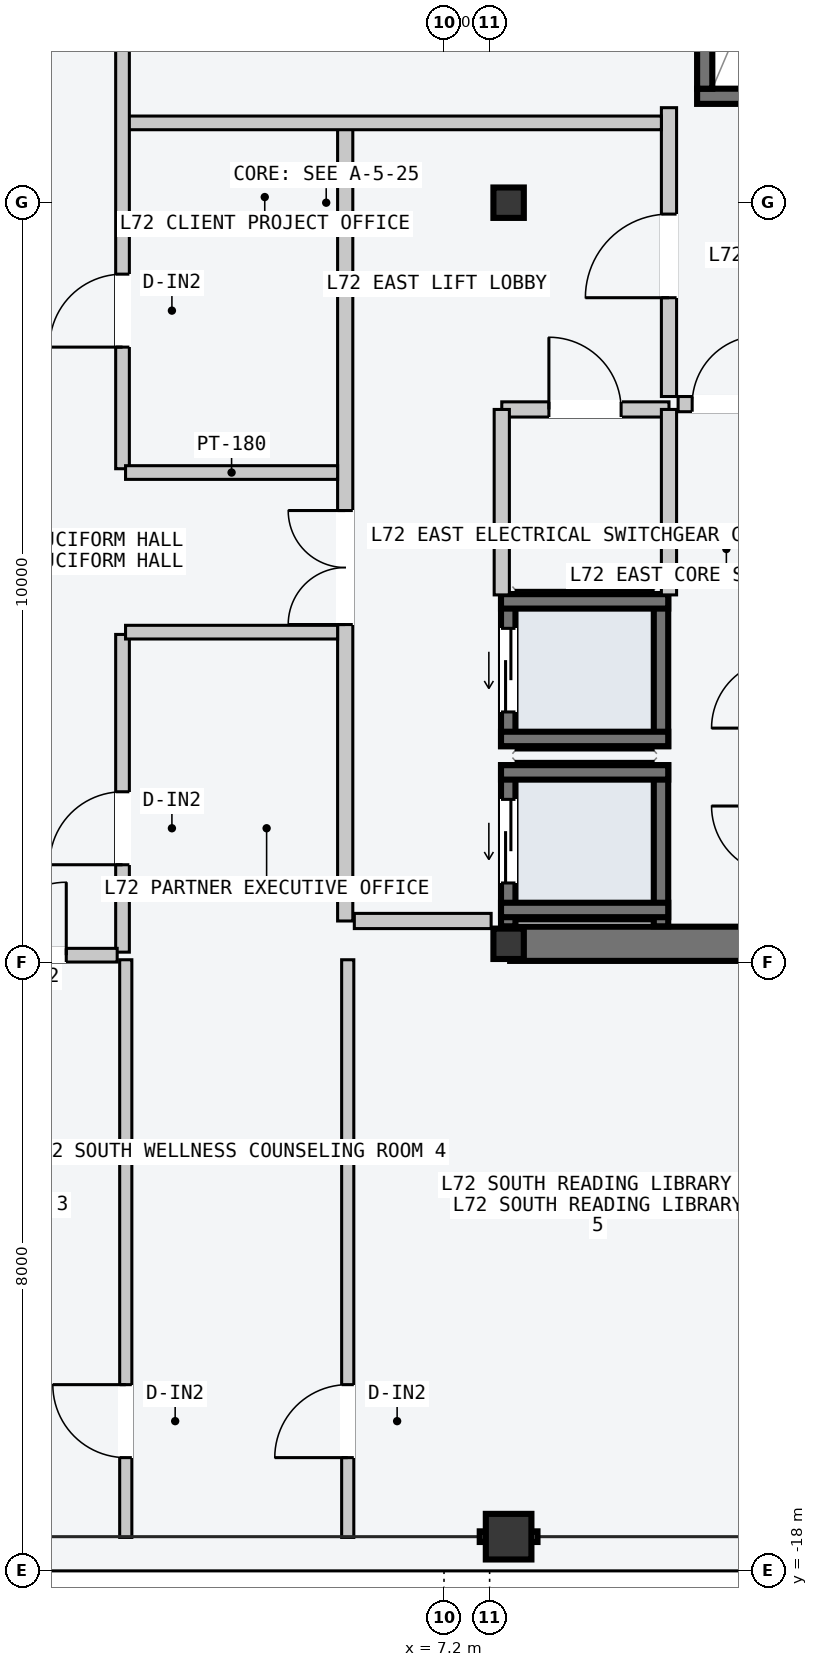
"""IFC4 building model, lengths in metres.
Left out: names, types, materials, properties, quantities, classifications, styles, units other than length and angle.
Written with IfcOpenShell. Run it as: python <this file> out.ifc"""

import sys

from ifc_helpers import new_model, si_unit, direction, frame, frame_2d, origin, origin_2d, place, context, subcontext, project, spatial, rectangle, hollow_rectangle, i_section, extrude, element, fill, save


model = new_model("IFC4")
c1 = context("Model", 3, precision=1e-05, world=origin(), true_north=direction((0.0, 1.0)))
c2 = subcontext(c1, "Body", "Model", "MODEL_VIEW")
j1 = project(units=[si_unit("LENGTHUNIT", "METRE"), si_unit("PLANEANGLEUNIT", "RADIAN")], contexts=[c1])
p1 = place(None, origin())
s1 = spatial("IfcSite", under=j1, at=p1, CompositionType="ELEMENT")
p2 = place(p1, origin())
s2 = spatial("IfcBuilding", under=s1, at=p2, CompositionType="ELEMENT")
p3 = place(p2, frame((0.0, 0.0, 272.4)))
s3 = spatial("IfcBuildingStorey", under=s2, at=p3, CompositionType="ELEMENT", Elevation=272.4)
p4 = place(p3, frame((8.07, -9.75, -0.2), z_axis=(0.0, 0.0, 1.0), x_axis=(1.0, 0.0, 0.0)))
e1 = element("IfcWall", 1, at=p4, inside=s3, PredefinedType="SHEAR", context=c2, shape_type="SweptSolid", body=[
    extrude(rectangle(XDim=6.46, YDim=0.45, at=frame_2d((3.23, 0.0))), origin(), (0.0, 0.0, 1.0), 3.6),
])
p5 = place(p3, frame((10.53, 1.4, -0.2), z_axis=(0.0, 0.0, 1.0), x_axis=(1.0, 0.0, 0.0)))
e2 = element("IfcWall", 2, at=p5, inside=s3, PredefinedType="SOLIDWALL", context=c2, shape_type="SweptSolid", body=[
    extrude(rectangle(XDim=3.72, YDim=0.2, at=frame_2d((1.86, 0.0))), origin(), (0.0, 0.0, 1.0), 3.6),
])
p6 = place(p5, frame((1.5, 0.0, 0.2)))
e3 = element("IfcOpeningElement", 3, at=p6, cuts=e2, PredefinedType="OPENING", context=c2, shape_type="SweptSolid", body=[
    extrude(rectangle(XDim=1.12, YDim=2.18, at=frame_2d((0.56, 1.09))), frame((0.0, 0.11, 0.0), z_axis=(0.0, -1.0, 0.0), x_axis=(1.0, 0.0, 0.0)), (0.0, 0.0, 1.0), 0.22),
])
p7 = place(p3, frame((10.63, 1.5, -0.2), z_axis=(0.0, 0.0, 1.0), x_axis=(0.0, 1.0, 0.0)))
e4 = element("IfcWall", 4, at=p7, inside=s3, PredefinedType="SOLIDWALL", context=c2, shape_type="SweptSolid", body=[
    extrude(rectangle(XDim=7.8, YDim=0.2, at=frame_2d((3.9, 0.0))), origin(), (0.0, 0.0, 1.0), 3.6),
])
for number, where, z_axis, x_axis in (
    (5, (8.05, -9.75, 0.0), (0.0, 0.0, 1.0), (1.0, 0.0, 0.0)),
    (6, (8.05, 0.0, 0.0), (0.0, 0.0, 1.0), (1.0, 0.0, 0.0)),
):
    element("IfcColumn", number, at=place(p3, frame(where, z_axis=z_axis, x_axis=x_axis)), inside=s3, PredefinedType="COLUMN", context=c2, shape_type="SweptSolid", body=[
        extrude(i_section(OverallWidth=0.4, OverallDepth=0.4, WebThickness=0.013, FlangeThickness=0.021, at=origin_2d()), origin(), (0.0, 0.0, 1.0), 3.6),
    ])
p8 = place(p3, frame((8.05, -17.55, 0.0), z_axis=(0.0, 0.0, 1.0), x_axis=(1.0, 0.0, 0.0)))
e7 = element("IfcColumn", 7, at=p8, inside=s3, PredefinedType="COLUMN", context=c2, shape_type="SweptSolid", body=[
    extrude(hollow_rectangle(XDim=0.6, YDim=0.6, WallThickness=0.025, at=origin_2d()), origin(), (0.0, 0.0, 1.0), 3.6),
])
p9 = place(p3, frame((8.045, -9.52, -0.2), z_axis=(0.0, 0.0, 1.0), x_axis=(0.0, 1.0, 0.0)))
e8 = element("IfcWall", 8, at=p9, inside=s3, PredefinedType="SOLIDWALL", context=c2, shape_type="SweptSolid", body=[
    extrude(rectangle(XDim=2.12, YDim=0.19, at=frame_2d((1.06, 0.0))), origin(), (0.0, 0.0, 1.0), 3.6),
])
p10 = place(p9, frame((0.57, 0.0, 0.2)))
e9 = element("IfcOpeningElement", 9, at=p10, cuts=e8, PredefinedType="OPENING", context=c2, shape_type="SweptSolid", body=[
    extrude(rectangle(XDim=1.1, YDim=2.2, at=frame_2d((0.55, 1.1))), frame((0.0, 0.105, 0.0), z_axis=(0.0, -1.0, 0.0), x_axis=(1.0, 0.0, 0.0)), (0.0, 0.0, 1.0), 0.21),
])
p11 = place(p3, frame((10.055, -9.52, -0.2), z_axis=(0.0, 0.0, 1.0), x_axis=(0.0, 1.0, 0.0)))
e10 = element("IfcWall", 10, at=p11, inside=s3, PredefinedType="SOLIDWALL", context=c2, shape_type="SweptSolid", body=[
    extrude(rectangle(XDim=2.12, YDim=0.19, at=frame_2d((1.06, 0.0))), origin(), (0.0, 0.0, 1.0), 3.6),
])
for number, where, z_axis, x_axis in (
    (11, (7.95, -7.495, -0.2), (0.0, 0.0, 1.0), (1.0, 0.0, 0.0)),
    (12, (7.95, -9.305, -0.2), (0.0, 0.0, 1.0), (1.0, 0.0, 0.0)),
):
    element("IfcWall", number, at=place(p3, frame(where, z_axis=z_axis, x_axis=x_axis)), inside=s3, PredefinedType="SOLIDWALL", context=c2, shape_type="SweptSolid", body=[
        extrude(rectangle(XDim=2.2, YDim=0.19, at=frame_2d((1.1, 0.0))), origin(), (0.0, 0.0, 1.0), 3.6),
    ])
p12 = place(p3, frame((8.045, -7.15, -0.2), z_axis=(0.0, 0.0, 1.0), x_axis=(0.0, 1.0, 0.0)))
e13 = element("IfcWall", 13, at=p12, inside=s3, PredefinedType="SOLIDWALL", context=c2, shape_type="SweptSolid", body=[
    extrude(rectangle(XDim=2.0, YDim=0.19, at=frame_2d((1.0, 0.0))), origin(), (0.0, 0.0, 1.0), 3.6),
])
p13 = place(p12, frame((0.45, 0.0, 0.2)))
e14 = element("IfcOpeningElement", 14, at=p13, cuts=e13, PredefinedType="OPENING", context=c2, shape_type="SweptSolid", body=[
    extrude(rectangle(XDim=1.1, YDim=2.2, at=frame_2d((0.55, 1.1))), frame((0.0, 0.105, 0.0), z_axis=(0.0, -1.0, 0.0), x_axis=(1.0, 0.0, 0.0)), (0.0, 0.0, 1.0), 0.21),
])
p14 = place(p3, frame((10.055, -7.15, -0.2), z_axis=(0.0, 0.0, 1.0), x_axis=(0.0, 1.0, 0.0)))
e15 = element("IfcWall", 15, at=p14, inside=s3, PredefinedType="SOLIDWALL", context=c2, shape_type="SweptSolid", body=[
    extrude(rectangle(XDim=2.0, YDim=0.19, at=frame_2d((1.0, 0.0))), origin(), (0.0, 0.0, 1.0), 3.6),
])
for number, where, z_axis, x_axis in (
    (16, (7.95, -5.245, -0.2), (0.0, 0.0, 1.0), (1.0, 0.0, 0.0)),
    (17, (7.95, -7.055, -0.2), (0.0, 0.0, 1.0), (1.0, 0.0, 0.0)),
):
    element("IfcWall", number, at=place(p3, frame(where, z_axis=z_axis, x_axis=x_axis)), inside=s3, PredefinedType="SOLIDWALL", context=c2, shape_type="SweptSolid", body=[
        extrude(rectangle(XDim=2.2, YDim=0.19, at=frame_2d((1.1, 0.0))), origin(), (0.0, 0.0, 1.0), 3.6),
    ])
p15 = place(p3, frame((5.9, -9.45, 0.0), z_axis=(0.0, 0.0, 1.0), x_axis=(0.0, 1.0, 0.0)))
e18 = element("IfcWall", 18, at=p15, inside=s3, PredefinedType="PARTITIONING", context=c2, shape_type="SweptSolid", body=[
    extrude(rectangle(XDim=10.5, YDim=0.2, at=frame_2d((5.25, 0.0))), origin(), (0.0, 0.0, 1.0), 3.4),
])
p16 = place(p15, frame((3.9, 0.0, 0.0)))
e19 = element("IfcOpeningElement", 19, at=p16, cuts=e18, PredefinedType="OPENING", context=c2, shape_type="SweptSolid", body=[
    extrude(rectangle(XDim=1.5, YDim=2.2, at=frame_2d((0.75, 1.1))), frame((0.0, 0.11, 0.0), z_axis=(0.0, -1.0, 0.0), x_axis=(1.0, 0.0, 0.0)), (0.0, 0.0, 1.0), 0.22),
])
p17 = place(p3, frame((6.02, -9.45, 0.0), z_axis=(0.0, 0.0, 1.0), x_axis=(1.0, 0.0, 0.0)))
e20 = element("IfcWall", 20, at=p17, inside=s3, PredefinedType="PARTITIONING", context=c2, shape_type="SweptSolid", body=[
    extrude(rectangle(XDim=1.8, YDim=0.2, at=frame_2d((0.9, 0.0))), origin(), (0.0, 0.0, 1.0), 3.4),
])
p18 = place(p3, frame((10.16, -2.55, 0.0), z_axis=(0.0, 0.0, 1.0), x_axis=(0.0, 1.0, 0.0)))
e21 = element("IfcWall", 21, at=p18, inside=s3, PredefinedType="PARTITIONING", context=c2, shape_type="SweptSolid", body=[
    extrude(rectangle(XDim=3.8, YDim=0.2, at=frame_2d((1.9, 0.0))), origin(), (0.0, 0.0, 1.0), 3.4),
])
p19 = place(p18, frame((1.3, 0.0, 0.0)))
e22 = element("IfcOpeningElement", 22, at=p19, cuts=e21, PredefinedType="OPENING", context=c2, shape_type="SweptSolid", body=[
    extrude(rectangle(XDim=1.1, YDim=2.15, at=frame_2d((0.55, 1.075))), frame((0.0, 0.11, 0.0), z_axis=(0.0, -1.0, 0.0), x_axis=(1.0, 0.0, 0.0)), (0.0, 0.0, 1.0), 0.22),
])
p20 = place(p3, frame((10.28, -2.65, 0.0), z_axis=(0.0, 0.0, 1.0), x_axis=(1.0, 0.0, 0.0)))
e23 = element("IfcWall", 23, at=p20, inside=s3, PredefinedType="PARTITIONING", context=c2, shape_type="SweptSolid", body=[
    extrude(rectangle(XDim=1.27, YDim=0.2, at=frame_2d((0.635, 0.0))), origin(), (0.0, 0.0, 1.0), 3.4),
])
p21 = place(p20, frame((0.185, 0.0, 0.0)))
e24 = element("IfcOpeningElement", 24, at=p21, cuts=e23, PredefinedType="OPENING", context=c2, shape_type="SweptSolid", body=[
    extrude(rectangle(XDim=0.9, YDim=2.15, at=frame_2d((0.45, 1.075))), frame((0.0, 0.11, 0.0), z_axis=(0.0, -1.0, 0.0), x_axis=(1.0, 0.0, 0.0)), (0.0, 0.0, 1.0), 0.22),
])
p22 = place(p3, frame((7.96, -2.72, 0.0), z_axis=(0.0, 0.0, 1.0), x_axis=(1.0, 0.0, 0.0)))
e25 = element("IfcWall", 25, at=p22, inside=s3, PredefinedType="PARTITIONING", context=c2, shape_type="SweptSolid", body=[
    extrude(rectangle(XDim=2.2, YDim=0.2, at=frame_2d((1.1, 0.0))), origin(), (0.0, 0.0, 1.0), 3.4),
])
p23 = place(p22, frame((0.62, 0.0, 0.0)))
e26 = element("IfcOpeningElement", 26, at=p23, cuts=e25, PredefinedType="OPENING", context=c2, shape_type="SweptSolid", body=[
    extrude(rectangle(XDim=0.95, YDim=2.1, at=frame_2d((0.475, 1.05))), frame((0.0, 0.11, 0.0), z_axis=(0.0, -1.0, 0.0), x_axis=(1.0, 0.0, 0.0)), (0.0, 0.0, 1.0), 0.22),
])
for number, where, z_axis, x_axis in (
    (27, (7.96, -5.16, 0.0), (0.0, 0.0, 1.0), (0.0, 1.0, 0.0)),
    (28, (10.16, -5.16, 0.0), (0.0, 0.0, 1.0), (0.0, 1.0, 0.0)),
):
    element("IfcWall", number, at=place(p3, frame(where, z_axis=z_axis, x_axis=x_axis)), inside=s3, PredefinedType="PARTITIONING", context=c2, shape_type="SweptSolid", body=[
        extrude(rectangle(XDim=2.44, YDim=0.2, at=frame_2d((1.22, 0.0))), origin(), (0.0, 0.0, 1.0), 3.4),
    ])
p24 = place(p3, frame((3.01, 1.05, 0.0), z_axis=(0.0, 0.0, 1.0), x_axis=(1.0, 0.0, 0.0)))
e29 = element("IfcWall", 29, at=p24, inside=s3, PredefinedType="PARTITIONING", context=c2, shape_type="SweptSolid", body=[
    extrude(rectangle(XDim=7.05, YDim=0.18, at=frame_2d((3.525, 0.0))), origin(), (0.0, 0.0, 1.0), 3.4),
])
p25 = place(p3, frame((2.97, -3.5, 0.0), z_axis=(0.0, 0.0, 1.0), x_axis=(0.0, 1.0, 0.0)))
e30 = element("IfcWall", 30, at=p25, inside=s3, PredefinedType="PARTITIONING", context=c2, shape_type="SweptSolid", body=[
    extrude(rectangle(XDim=13.67, YDim=0.18, at=frame_2d((6.835, 0.0))), origin(), (0.0, 0.0, 1.0), 3.4),
])
p26 = place(p25, frame((6.1, 0.0, 0.0)))
e31 = element("IfcOpeningElement", 31, at=p26, cuts=e30, PredefinedType="OPENING", context=c2, shape_type="SweptSolid", body=[
    extrude(rectangle(XDim=1.24, YDim=2.24, at=frame_2d((0.62, 1.12))), frame((0.0, 0.1, 0.0), z_axis=(0.0, -1.0, 0.0), x_axis=(1.0, 0.0, 0.0)), (0.0, 0.0, 1.0), 0.2),
])
p27 = place(p25, frame((1.6, 0.0, 0.0)))
e32 = element("IfcOpeningElement", 32, at=p27, cuts=e30, PredefinedType="OPENING", context=c2, shape_type="SweptSolid", body=[
    extrude(rectangle(XDim=0.96, YDim=2.18, at=frame_2d((0.48, 1.09))), frame((0.0, 0.1, 0.0), z_axis=(0.0, -1.0, 0.0), x_axis=(1.0, 0.0, 0.0)), (0.0, 0.0, 1.0), 0.2),
])
p28 = place(p3, frame((3.01, -3.55, 0.0), z_axis=(0.0, 0.0, 1.0), x_axis=(1.0, 0.0, 0.0)))
e33 = element("IfcWall", 33, at=p28, inside=s3, PredefinedType="PARTITIONING", context=c2, shape_type="SweptSolid", body=[
    extrude(rectangle(XDim=2.79, YDim=0.18, at=frame_2d((1.395, 0.0))), origin(), (0.0, 0.0, 1.0), 3.4),
])
p29 = place(p3, frame((2.97, -9.86, 0.0), z_axis=(0.0, 0.0, 1.0), x_axis=(0.0, 1.0, 0.0)))
e34 = element("IfcWall", 34, at=p29, inside=s3, PredefinedType="PARTITIONING", context=c2, shape_type="SweptSolid", body=[
    extrude(rectangle(XDim=4.18, YDim=0.18, at=frame_2d((2.09, 0.0))), origin(), (0.0, 0.0, 1.0), 3.4),
])
p30 = place(p29, frame((1.15, 0.0, 0.0)))
e35 = element("IfcOpeningElement", 35, at=p30, cuts=e34, PredefinedType="OPENING", context=c2, shape_type="SweptSolid", body=[
    extrude(rectangle(XDim=0.96, YDim=2.18, at=frame_2d((0.48, 1.09))), frame((0.0, 0.1, 0.0), z_axis=(0.0, -1.0, 0.0), x_axis=(1.0, 0.0, 0.0)), (0.0, 0.0, 1.0), 0.2),
])
p31 = place(p3, frame((3.01, -5.65, 0.0), z_axis=(0.0, 0.0, 1.0), x_axis=(1.0, 0.0, 0.0)))
e36 = element("IfcWall", 36, at=p31, inside=s3, PredefinedType="PARTITIONING", context=c2, shape_type="SweptSolid", body=[
    extrude(rectangle(XDim=2.79, YDim=0.18, at=frame_2d((1.395, 0.0))), origin(), (0.0, 0.0, 1.0), 3.4),
])
p32 = place(p3, frame((3.013, -17.56, 0.0), z_axis=(0.0, 0.0, 1.0), x_axis=(0.0, 1.0, 0.0)))
e37 = element("IfcWall", 37, at=p32, inside=s3, PredefinedType="PARTITIONING", context=c2, shape_type="SweptSolid", body=[
    extrude(rectangle(XDim=7.6, YDim=0.16, at=frame_2d((3.8, 0.0))), origin(), (0.0, 0.0, 1.0), 3.4),
])
p33 = place(p32, frame((1.05, 0.0, 0.0)))
e38 = element("IfcOpeningElement", 38, at=p33, cuts=e37, PredefinedType="OPENING", context=c2, shape_type="SweptSolid", body=[
    extrude(rectangle(XDim=0.96, YDim=2.18, at=frame_2d((0.48, 1.09))), frame((0.0, 0.09, 0.0), z_axis=(0.0, -1.0, 0.0), x_axis=(1.0, 0.0, 0.0)), (0.0, 0.0, 1.0), 0.18),
])
p34 = place(p3, frame((5.933, -17.56, 0.0), z_axis=(0.0, 0.0, 1.0), x_axis=(0.0, 1.0, 0.0)))
e39 = element("IfcWall", 39, at=p34, inside=s3, PredefinedType="PARTITIONING", context=c2, shape_type="SweptSolid", body=[
    extrude(rectangle(XDim=7.6, YDim=0.16, at=frame_2d((3.8, 0.0))), origin(), (0.0, 0.0, 1.0), 3.4),
])
p35 = place(p34, frame((1.05, 0.0, 0.0)))
e40 = element("IfcOpeningElement", 40, at=p35, cuts=e39, PredefinedType="OPENING", context=c2, shape_type="SweptSolid", body=[
    extrude(rectangle(XDim=0.96, YDim=2.18, at=frame_2d((0.48, 1.09))), frame((0.0, 0.09, 0.0), z_axis=(0.0, -1.0, 0.0), x_axis=(1.0, 0.0, 0.0)), (0.0, 0.0, 1.0), 0.18),
])
p36 = place(p3, frame((0.6, -9.9, 0.0), z_axis=(0.0, 0.0, 1.0), x_axis=(1.0, 0.0, 0.0)))
e41 = element("IfcWall", 41, at=p36, inside=s3, PredefinedType="PARTITIONING", context=c2, shape_type="SweptSolid", body=[
    extrude(rectangle(XDim=2.3, YDim=0.18, at=frame_2d((1.15, 0.0))), origin(), (0.0, 0.0, 1.0), 3.4),
])
p37 = place(p36, frame((0.67, 0.0, 0.0)))
e42 = element("IfcOpeningElement", 42, at=p37, cuts=e41, PredefinedType="OPENING", context=c2, shape_type="SweptSolid", body=[
    extrude(rectangle(XDim=0.96, YDim=2.18, at=frame_2d((0.48, 1.09))), frame((0.0, 0.1, 0.0), z_axis=(0.0, -1.0, 0.0), x_axis=(1.0, 0.0, 0.0)), (0.0, 0.0, 1.0), 0.2),
])
p38 = place(p10, origin())
e43 = element("IfcDoor", 43, at=p38, inside=s3, OperationType="SLIDING_TO_LEFT", PredefinedType="DOOR", context=c2, shape_type="SweptSolid", body=[
    extrude(rectangle(XDim=1.1, YDim=2.2, at=frame_2d((0.55, 1.1))), frame((0.0, 0.025, 0.0), z_axis=(0.0, -1.0, 0.0), x_axis=(1.0, 0.0, 0.0)), (0.0, 0.0, 1.0), 0.05),
])
fill(e9, e43)
p39 = place(p13, origin())
e44 = element("IfcDoor", 44, at=p39, inside=s3, OperationType="SLIDING_TO_LEFT", PredefinedType="DOOR", context=c2, shape_type="SweptSolid", body=[
    extrude(rectangle(XDim=1.1, YDim=2.2, at=frame_2d((0.55, 1.1))), frame((0.0, 0.025, 0.0), z_axis=(0.0, -1.0, 0.0), x_axis=(1.0, 0.0, 0.0)), (0.0, 0.0, 1.0), 0.05),
])
fill(e14, e44)
p40 = place(p16, origin())
e45 = element("IfcDoor", 45, at=p40, inside=s3, OperationType="DOUBLE_DOOR_SINGLE_SWING", PredefinedType="DOOR", context=c2, shape_type="SweptSolid", body=[
    extrude(rectangle(XDim=1.5, YDim=2.2, at=frame_2d((0.75, 1.1))), frame((0.0, 0.025, 0.0), z_axis=(0.0, -1.0, 0.0), x_axis=(1.0, 0.0, 0.0)), (0.0, 0.0, 1.0), 0.05),
])
fill(e19, e45)
p41 = place(p19, origin())
e46 = element("IfcDoor", 46, at=p41, inside=s3, OperationType="SINGLE_SWING_LEFT", PredefinedType="DOOR", context=c2, shape_type="SweptSolid", body=[
    extrude(rectangle(XDim=1.1, YDim=2.15, at=frame_2d((0.55, 1.075))), frame((0.0, 0.025, 0.0), z_axis=(0.0, -1.0, 0.0), x_axis=(1.0, 0.0, 0.0)), (0.0, 0.0, 1.0), 0.05),
])
fill(e22, e46)
p42 = place(p21, origin())
e47 = element("IfcDoor", 47, at=p42, inside=s3, OperationType="SINGLE_SWING_RIGHT", PredefinedType="DOOR", context=c2, shape_type="SweptSolid", body=[
    extrude(rectangle(XDim=0.9, YDim=2.15, at=frame_2d((0.45, 1.075))), frame((0.0, 0.025, 0.0), z_axis=(0.0, -1.0, 0.0), x_axis=(1.0, 0.0, 0.0)), (0.0, 0.0, 1.0), 0.05),
])
fill(e24, e47)
p43 = place(p23, origin())
e48 = element("IfcDoor", 48, at=p43, inside=s3, OperationType="SINGLE_SWING_LEFT", PredefinedType="DOOR", context=c2, shape_type="SweptSolid", body=[
    extrude(rectangle(XDim=0.95, YDim=2.1, at=frame_2d((0.475, 1.05))), frame((0.0, 0.025, 0.0), z_axis=(0.0, -1.0, 0.0), x_axis=(1.0, 0.0, 0.0)), (0.0, 0.0, 1.0), 0.05),
])
fill(e26, e48)
p44 = place(p27, origin())
e49 = element("IfcDoor", 49, at=p44, inside=s3, OperationType="SINGLE_SWING_LEFT", PredefinedType="DOOR", context=c2, shape_type="SweptSolid", body=[
    extrude(rectangle(XDim=0.96, YDim=2.18, at=frame_2d((0.48, 1.09))), frame((0.0, 0.025, 0.0), z_axis=(0.0, -1.0, 0.0), x_axis=(1.0, 0.0, 0.0)), (0.0, 0.0, 1.0), 0.05),
])
fill(e32, e49)
p45 = place(p30, origin())
e50 = element("IfcDoor", 50, at=p45, inside=s3, OperationType="SINGLE_SWING_LEFT", PredefinedType="DOOR", context=c2, shape_type="SweptSolid", body=[
    extrude(rectangle(XDim=0.96, YDim=2.18, at=frame_2d((0.48, 1.09))), frame((0.0, 0.025, 0.0), z_axis=(0.0, -1.0, 0.0), x_axis=(1.0, 0.0, 0.0)), (0.0, 0.0, 1.0), 0.05),
])
fill(e35, e50)
p46 = place(p33, origin())
e51 = element("IfcDoor", 51, at=p46, inside=s3, OperationType="SINGLE_SWING_RIGHT", PredefinedType="DOOR", context=c2, shape_type="SweptSolid", body=[
    extrude(rectangle(XDim=0.96, YDim=2.18, at=frame_2d((0.48, 1.09))), frame((0.0, 0.025, 0.0), z_axis=(0.0, -1.0, 0.0), x_axis=(1.0, 0.0, 0.0)), (0.0, 0.0, 1.0), 0.05),
])
fill(e38, e51)
p47 = place(p35, origin())
e52 = element("IfcDoor", 52, at=p47, inside=s3, OperationType="SINGLE_SWING_LEFT", PredefinedType="DOOR", context=c2, shape_type="SweptSolid", body=[
    extrude(rectangle(XDim=0.96, YDim=2.18, at=frame_2d((0.48, 1.09))), frame((0.0, 0.025, 0.0), z_axis=(0.0, -1.0, 0.0), x_axis=(1.0, 0.0, 0.0)), (0.0, 0.0, 1.0), 0.05),
])
fill(e40, e52)
p48 = place(p37, origin())
e53 = element("IfcDoor", 53, at=p48, inside=s3, OperationType="SINGLE_SWING_RIGHT", PredefinedType="DOOR", context=c2, shape_type="SweptSolid", body=[
    extrude(rectangle(XDim=0.96, YDim=2.18, at=frame_2d((0.48, 1.09))), frame((0.0, 0.025, 0.0), z_axis=(0.0, -1.0, 0.0), x_axis=(1.0, 0.0, 0.0)), (0.0, 0.0, 1.0), 0.05),
])
fill(e42, e53)
save(model, sys.argv[1])
